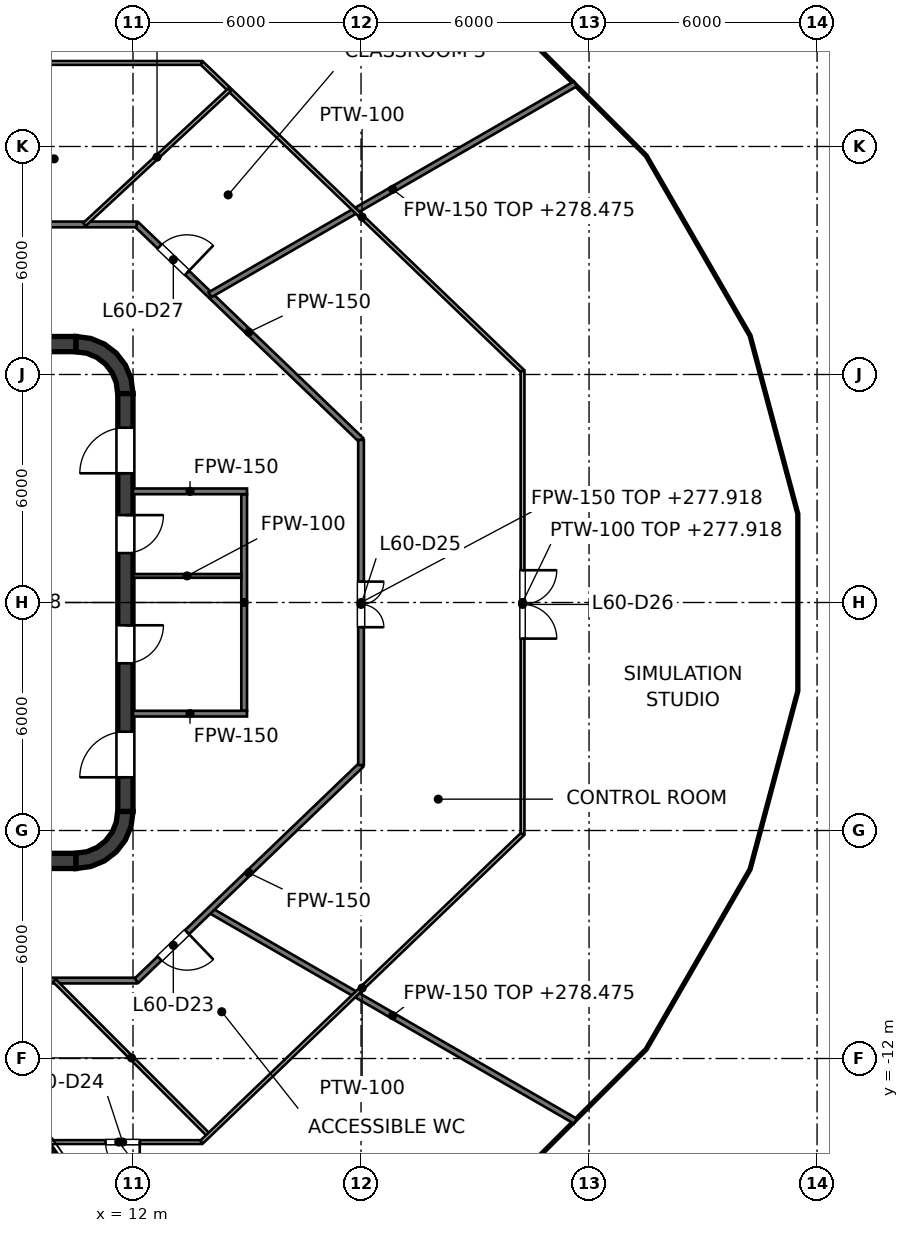
"""IFC4 building model, lengths in metres.
Left out: names, types, materials, properties, quantities, classifications, styles, units other than length and angle.
Written with IfcOpenShell. Run it as: python <this file> out.ifc"""

import sys

from ifc_helpers import new_model, si_unit, direction, frame, frame_2d, origin, place, context, subcontext, project, spatial, polyline, rectangle, outline, extrude, element, fill, save


model = new_model("IFC4")
c1 = context("Model", 3, precision=1e-05, world=origin(), true_north=direction((0.0, 1.0)))
c2 = subcontext(c1, "Body", "Model", "MODEL_VIEW")
j1 = project(units=[si_unit("LENGTHUNIT", "METRE"), si_unit("PLANEANGLEUNIT", "RADIAN")], contexts=[c1])
p1 = place(None, origin())
s1 = spatial("IfcSite", under=j1, at=p1, CompositionType="ELEMENT")
p2 = place(p1, origin())
s2 = spatial("IfcBuilding", under=s1, at=p2, CompositionType="ELEMENT")
p3 = place(p2, frame((0.0, 0.0, 275.0)))
s3 = spatial("IfcBuildingStorey", under=s2, at=p3, CompositionType="ELEMENT", Elevation=275.0)
for number, where, z_axis, x_axis in (
    (1, (-10.5, 6.8, 0.0), (0.0, 0.0, 1.0), (1.0, 0.0, 0.0)),
    (2, (-10.5, -6.8, 0.0), (0.0, 0.0, 1.0), (1.0, 0.0, 0.0)),
):
    element("IfcWall", number, at=place(p3, frame(where, z_axis=z_axis, x_axis=x_axis)), inside=s3, PredefinedType="SHEAR", context=c2, shape_type="SweptSolid", body=[
        extrude(rectangle(XDim=21.0, YDim=0.4, at=frame_2d((10.5, 0.0))), origin(), (0.0, 0.0, 1.0), 4.0),
    ])
p4 = place(p3, frame((11.8, -5.5, 0.0), z_axis=(0.0, 0.0, 1.0), x_axis=(0.0, 1.0, 0.0)))
e3 = element("IfcWall", 3, at=p4, inside=s3, PredefinedType="SHEAR", context=c2, shape_type="SweptSolid", body=[
    extrude(rectangle(XDim=11.0, YDim=0.4, at=frame_2d((5.5, 0.0))), origin(), (0.0, 0.0, 1.0), 4.0),
])
p5 = place(p4, frame((3.9, 0.0, 0.0)))
e4 = element("IfcOpeningElement", 4, at=p5, cuts=e3, PredefinedType="OPENING", context=c2, shape_type="SweptSolid", body=[
    extrude(rectangle(XDim=1.0, YDim=2.1, at=frame_2d((0.5, 1.05))), frame((0.0, 0.2, 0.0), z_axis=(0.0, -1.0, 0.0), x_axis=(1.0, 0.0, 0.0)), (0.0, 0.0, 1.0), 0.4),
])
p6 = place(p4, frame((6.8, 0.0, 0.0)))
e5 = element("IfcOpeningElement", 5, at=p6, cuts=e3, PredefinedType="OPENING", context=c2, shape_type="SweptSolid", body=[
    extrude(rectangle(XDim=1.0, YDim=2.1, at=frame_2d((0.5, 1.05))), frame((0.0, 0.2, 0.0), z_axis=(0.0, -1.0, 0.0), x_axis=(1.0, 0.0, 0.0)), (0.0, 0.0, 1.0), 0.4),
])
p7 = place(p4, frame((0.9, 0.0, 0.0)))
e6 = element("IfcOpeningElement", 6, at=p7, cuts=e3, PredefinedType="OPENING", context=c2, shape_type="SweptSolid", body=[
    extrude(rectangle(XDim=1.2, YDim=2.1, at=frame_2d((0.6, 1.05))), frame((0.0, 0.2, 0.0), z_axis=(0.0, -1.0, 0.0), x_axis=(1.0, 0.0, 0.0)), (0.0, 0.0, 1.0), 0.4),
])
p8 = place(p4, frame((8.9, 0.0, 0.0)))
e7 = element("IfcOpeningElement", 7, at=p8, cuts=e3, PredefinedType="OPENING", context=c2, shape_type="SweptSolid", body=[
    extrude(rectangle(XDim=1.2, YDim=2.1, at=frame_2d((0.6, 1.05))), frame((0.0, 0.2, 0.0), z_axis=(0.0, -1.0, 0.0), x_axis=(1.0, 0.0, 0.0)), (0.0, 0.0, 1.0), 0.4),
])
p9 = place(p3, origin())
e8 = element("IfcWall", 8, at=p9, inside=s3, PredefinedType="SHEAR", context=c2, shape_type="SweptSolid", body=[
    extrude(outline(polyline([(10.5, 7.0), (10.5, 6.596), (10.784, 6.559), (11.048, 6.45), (11.275, 6.275), (11.45, 6.048), (11.559, 5.784), (11.596, 5.5), (12.0, 5.5), (11.949, 5.888), (11.799, 6.25), (11.561, 6.561), (11.25, 6.799), (10.888, 6.949), (10.5, 7.0)])), origin(), (0.0, 0.0, 1.0), 4.0),
])
e9 = element("IfcWall", 9, at=p9, inside=s3, PredefinedType="SHEAR", context=c2, shape_type="SweptSolid", body=[
    extrude(outline(polyline([(12.0, -5.5), (11.596, -5.5), (11.559, -5.784), (11.45, -6.048), (11.275, -6.275), (11.048, -6.45), (10.784, -6.559), (10.5, -6.596), (10.5, -7.0), (10.888, -6.949), (11.25, -6.799), (11.561, -6.561), (11.799, -6.25), (11.949, -5.888), (12.0, -5.5)])), origin(), (0.0, 0.0, 1.0), 4.0),
])
p10 = place(p3, frame((14.925, -2.85, 0.0), z_axis=(0.0, 0.0, 1.0), x_axis=(0.0, 1.0, 0.0)))
e10 = element("IfcWall", 10, at=p10, inside=s3, PredefinedType="PARTITIONING", context=c2, shape_type="SweptSolid", body=[
    extrude(rectangle(XDim=5.7, YDim=0.15, at=frame_2d((2.85, 0.0))), origin(), (0.0, 0.0, 1.0), 2.918),
])
for number, where, z_axis, x_axis in (
    (11, (12.0, 2.925, 0.0), (0.0, 0.0, 1.0), (1.0, 0.0, 0.0)),
    (12, (12.0, -2.925, 0.0), (0.0, 0.0, 1.0), (1.0, 0.0, 0.0)),
):
    element("IfcWall", number, at=place(p3, frame(where, z_axis=z_axis, x_axis=x_axis)), inside=s3, PredefinedType="PARTITIONING", context=c2, shape_type="SweptSolid", body=[
        extrude(rectangle(XDim=3.0, YDim=0.15, at=frame_2d((1.5, 0.0))), origin(), (0.0, 0.0, 1.0), 2.927),
    ])
p11 = place(p3, frame((12.0, 0.7, 0.0), z_axis=(0.0, 0.0, 1.0), x_axis=(1.0, 0.0, 0.0)))
e13 = element("IfcWall", 13, at=p11, inside=s3, PredefinedType="PARTITIONING", context=c2, shape_type="SweptSolid", body=[
    extrude(rectangle(XDim=2.85, YDim=0.1, at=frame_2d((1.425, 0.0))), origin(), (0.0, 0.0, 1.0), 3.85),
])
p12 = place(p3, frame((12.095, 9.949, 0.0), z_axis=(0.0, 0.0, 1.0), x_axis=(0.721290181137, -0.692633001376, 0.0)))
e14 = element("IfcWall", 14, at=p12, inside=s3, PredefinedType="PARTITIONING", context=c2, shape_type="SweptSolid", body=[
    extrude(rectangle(XDim=8.187, YDim=0.15, at=frame_2d((4.094, 0.0))), origin(), (0.0, 0.0, 1.0), 2.927),
])
p13 = place(p12, frame((0.838, 0.0, 0.0)))
e15 = element("IfcOpeningElement", 15, at=p13, cuts=e14, PredefinedType="OPENING", context=c2, shape_type="SweptSolid", body=[
    extrude(rectangle(XDim=1.0, YDim=2.1, at=frame_2d((0.5, 1.05))), frame((0.0, 0.075, 0.0), z_axis=(0.0, -1.0, 0.0), x_axis=(1.0, 0.0, 0.0)), (0.0, 0.0, 1.0), 0.15),
])
p14 = place(p3, frame((14.024, -8.097, 0.0), z_axis=(0.0, 0.0, 1.0), x_axis=(0.86601678782, -0.50001492299, 0.0)))
e16 = element("IfcWall", 16, at=p14, inside=s3, PredefinedType="PARTITIONING", context=c2, shape_type="SweptSolid", body=[
    extrude(rectangle(XDim=11.104, YDim=0.15, at=frame_2d((5.552, 0.0))), origin(), (0.0, 0.0, 1.0), 3.475),
])
p15 = place(p3, frame((-12.095, -9.949, 0.0), z_axis=(0.0, 0.0, 1.0), x_axis=(1.0, 0.0, 0.0)))
e17 = element("IfcWall", 17, at=p15, inside=s3, PredefinedType="PARTITIONING", context=c2, shape_type="SweptSolid", body=[
    extrude(rectangle(XDim=24.19, YDim=0.15, at=frame_2d((12.095, 0.0))), origin(), (0.0, 0.0, 1.0), 2.927),
])
p16 = place(p15, frame((4.215, 0.0, 0.0)))
e18 = element("IfcOpeningElement", 18, at=p16, cuts=e17, PredefinedType="OPENING", context=c2, shape_type="SweptSolid", body=[
    extrude(rectangle(XDim=1.0, YDim=2.1, at=frame_2d((0.5, 1.05))), frame((0.0, 0.075, 0.0), z_axis=(0.0, -1.0, 0.0), x_axis=(1.0, 0.0, 0.0)), (0.0, 0.0, 1.0), 0.15),
])
p17 = place(p15, frame((10.029, 0.0, 0.0)))
e19 = element("IfcOpeningElement", 19, at=p17, cuts=e17, PredefinedType="OPENING", context=c2, shape_type="SweptSolid", body=[
    extrude(rectangle(XDim=1.0, YDim=2.1, at=frame_2d((0.5, 1.05))), frame((0.0, 0.075, 0.0), z_axis=(0.0, -1.0, 0.0), x_axis=(1.0, 0.0, 0.0)), (0.0, 0.0, 1.0), 0.15),
])
p18 = place(p15, frame((16.297, 0.0, 0.0)))
e20 = element("IfcOpeningElement", 20, at=p18, cuts=e17, PredefinedType="OPENING", context=c2, shape_type="SweptSolid", body=[
    extrude(rectangle(XDim=1.0, YDim=2.1, at=frame_2d((0.5, 1.05))), frame((0.0, 0.075, 0.0), z_axis=(0.0, -1.0, 0.0), x_axis=(1.0, 0.0, 0.0)), (0.0, 0.0, 1.0), 0.15),
])
p19 = place(p3, frame((-12.095, 9.949, 0.0), z_axis=(0.0, 0.0, 1.0), x_axis=(1.0, 0.0, 0.0)))
e21 = element("IfcWall", 21, at=p19, inside=s3, PredefinedType="PARTITIONING", context=c2, shape_type="SweptSolid", body=[
    extrude(rectangle(XDim=24.19, YDim=0.15, at=frame_2d((12.095, 0.0))), origin(), (0.0, 0.0, 1.0), 2.927),
])
p20 = place(p19, frame((20.297, 0.0, 0.0)))
e22 = element("IfcOpeningElement", 22, at=p20, cuts=e21, PredefinedType="OPENING", context=c2, shape_type="SweptSolid", body=[
    extrude(rectangle(XDim=1.0, YDim=2.1, at=frame_2d((0.5, 1.05))), frame((0.0, 0.075, 0.0), z_axis=(0.0, -1.0, 0.0), x_axis=(1.0, 0.0, 0.0)), (0.0, 0.0, 1.0), 0.15),
])
p21 = place(p19, frame((16.269, 0.0, 0.0)))
e23 = element("IfcOpeningElement", 23, at=p21, cuts=e21, PredefinedType="OPENING", context=c2, shape_type="SweptSolid", body=[
    extrude(rectangle(XDim=1.0, YDim=2.1, at=frame_2d((0.5, 1.05))), frame((0.0, 0.075, 0.0), z_axis=(0.0, -1.0, 0.0), x_axis=(1.0, 0.0, 0.0)), (0.0, 0.0, 1.0), 0.15),
])
p22 = place(p19, frame((12.14, 0.0, 0.0)))
e24 = element("IfcOpeningElement", 24, at=p22, cuts=e21, PredefinedType="OPENING", context=c2, shape_type="SweptSolid", body=[
    extrude(rectangle(XDim=1.0, YDim=2.1, at=frame_2d((0.5, 1.05))), frame((0.0, 0.075, 0.0), z_axis=(0.0, -1.0, 0.0), x_axis=(1.0, 0.0, 0.0)), (0.0, 0.0, 1.0), 0.15),
])
p23 = place(p19, frame((5.782, 0.0, 0.0)))
e25 = element("IfcOpeningElement", 25, at=p23, cuts=e21, PredefinedType="OPENING", context=c2, shape_type="SweptSolid", body=[
    extrude(rectangle(XDim=1.0, YDim=2.1, at=frame_2d((0.5, 1.05))), frame((0.0, 0.075, 0.0), z_axis=(0.0, -1.0, 0.0), x_axis=(1.0, 0.0, 0.0)), (0.0, 0.0, 1.0), 0.15),
])
p24 = place(p3, frame((14.024, 8.097, 0.0), z_axis=(0.0, 0.0, 1.0), x_axis=(0.866044269757, 0.499967321754, 0.0)))
e26 = element("IfcWall", 26, at=p24, inside=s3, PredefinedType="PARTITIONING", context=c2, shape_type="SweptSolid", body=[
    extrude(rectangle(XDim=11.105, YDim=0.15, at=frame_2d((5.552, 0.0))), origin(), (0.0, 0.0, 1.0), 3.475),
])
p25 = place(p3, frame((12.095, -9.949, 0.0), z_axis=(0.0, 0.0, 1.0), x_axis=(0.721290181137, 0.692633001376, 0.0)))
e27 = element("IfcWall", 27, at=p25, inside=s3, PredefinedType="PARTITIONING", context=c2, shape_type="SweptSolid", body=[
    extrude(rectangle(XDim=8.187, YDim=0.15, at=frame_2d((4.094, 0.0))), origin(), (0.0, 0.0, 1.0), 2.927),
])
p26 = place(p25, frame((0.839, 0.0, 0.0)))
e28 = element("IfcOpeningElement", 28, at=p26, cuts=e27, PredefinedType="OPENING", context=c2, shape_type="SweptSolid", body=[
    extrude(rectangle(XDim=1.0, YDim=2.1, at=frame_2d((0.5, 1.05))), frame((0.0, 0.075, 0.0), z_axis=(0.0, -1.0, 0.0), x_axis=(1.0, 0.0, 0.0)), (0.0, 0.0, 1.0), 0.15),
])
p27 = place(p3, frame((18.0, -4.278, 0.0), z_axis=(0.0, 0.0, 1.0), x_axis=(0.0, 1.0, 0.0)))
e29 = element("IfcWall", 29, at=p27, inside=s3, PredefinedType="PARTITIONING", context=c2, shape_type="SweptSolid", body=[
    extrude(rectangle(XDim=8.556, YDim=0.15, at=frame_2d((4.278, 0.0))), origin(), (0.0, 0.0, 1.0), 2.918),
])
p28 = place(p27, frame((3.627, 0.0, 0.0)))
e30 = element("IfcOpeningElement", 30, at=p28, cuts=e29, PredefinedType="OPENING", context=c2, shape_type="SweptSolid", body=[
    extrude(rectangle(XDim=1.2, YDim=2.1, at=frame_2d((0.6, 1.05))), frame((0.0, 0.075, 0.0), z_axis=(0.0, -1.0, 0.0), x_axis=(1.0, 0.0, 0.0)), (0.0, 0.0, 1.0), 0.15),
])
p29 = place(p3, frame((9.797, -14.251, 0.0), z_axis=(0.0, 0.0, 1.0), x_axis=(0.566456270614, -0.824091799184, 0.0)))
e31 = element("IfcWall", 31, at=p29, inside=s3, PredefinedType="PARTITIONING", context=c2, shape_type="SweptSolid", body=[
    extrude(rectangle(XDim=7.427, YDim=0.05, at=frame_2d((3.713, 0.0))), origin(), (0.0, 0.0, 1.0), 2.927),
])
p30 = place(p3, frame((9.931, -9.949, 0.0), z_axis=(0.0, 0.0, 1.0), x_axis=(0.706405887394, -0.707806980932, 0.0)))
e32 = element("IfcWall", 32, at=p30, inside=s3, PredefinedType="PARTITIONING", context=c2, shape_type="SweptSolid", body=[
    extrude(rectangle(XDim=5.75, YDim=0.1, at=frame_2d((2.875, 0.0))), origin(), (0.0, 0.0, 1.0), 3.85),
])
p31 = place(p3, frame((13.805, 14.199, 0.0), z_axis=(0.0, 0.0, 1.0), x_axis=(0.721245635319, -0.692679387259, 0.0)))
e33 = element("IfcWall", 33, at=p31, inside=s3, PredefinedType="PARTITIONING", context=c2, shape_type="SweptSolid", body=[
    extrude(rectangle(XDim=11.709, YDim=0.1, at=frame_2d((5.854, 0.0))), origin(), (0.0, 0.0, 1.0), 2.927),
])
p32 = place(p3, frame((9.445, -14.199, 0.0), z_axis=(0.0, 0.0, 1.0), x_axis=(1.0, 0.0, 0.0)))
e34 = element("IfcWall", 34, at=p32, inside=s3, PredefinedType="PARTITIONING", context=c2, shape_type="SweptSolid", body=[
    extrude(rectangle(XDim=4.36, YDim=0.1, at=frame_2d((2.18, 0.0))), origin(), (0.0, 0.0, 1.0), 2.927),
])
p33 = place(p32, frame((1.833, 0.0, 0.0)))
e35 = element("IfcOpeningElement", 35, at=p33, cuts=e34, PredefinedType="OPENING", context=c2, shape_type="SweptSolid", body=[
    extrude(rectangle(XDim=0.9, YDim=2.1, at=frame_2d((0.45, 1.05))), frame((0.0, 0.05, 0.0), z_axis=(0.0, -1.0, 0.0), x_axis=(1.0, 0.0, 0.0)), (0.0, 0.0, 1.0), 0.1),
])
p34 = place(p3, frame((-13.805, 14.199, 0.0), z_axis=(0.0, 0.0, 1.0), x_axis=(1.0, 0.0, 0.0)))
e36 = element("IfcWall", 36, at=p34, inside=s3, PredefinedType="PARTITIONING", context=c2, shape_type="SweptSolid", body=[
    extrude(rectangle(XDim=27.61, YDim=0.1, at=frame_2d((13.805, 0.0))), origin(), (0.0, 0.0, 1.0), 2.927),
])
p35 = place(p34, frame((20.047, 0.0, 0.0)))
e37 = element("IfcOpeningElement", 37, at=p35, cuts=e36, PredefinedType="OPENING", context=c2, shape_type="SweptSolid", body=[
    extrude(rectangle(XDim=0.9, YDim=2.1, at=frame_2d((0.45, 1.05))), frame((0.0, 0.05, 0.0), z_axis=(0.0, -1.0, 0.0), x_axis=(1.0, 0.0, 0.0)), (0.0, 0.0, 1.0), 0.1),
])
p36 = place(p34, frame((4.928, 0.0, 0.0)))
e38 = element("IfcOpeningElement", 38, at=p36, cuts=e36, PredefinedType="OPENING", context=c2, shape_type="SweptSolid", body=[
    extrude(rectangle(XDim=1.8, YDim=2.1, at=frame_2d((0.9, 1.05))), frame((0.0, 0.05, 0.0), z_axis=(0.0, -1.0, 0.0), x_axis=(1.0, 0.0, 0.0)), (0.0, 0.0, 1.0), 0.1),
])
p37 = place(p3, frame((10.723, 9.949, 0.0), z_axis=(0.0, 0.0, 1.0), x_axis=(0.733025495712, 0.680201163359, 0.0)))
e39 = element("IfcWall", 39, at=p37, inside=s3, PredefinedType="PARTITIONING", context=c2, shape_type="SweptSolid", body=[
    extrude(rectangle(XDim=5.209, YDim=0.1, at=frame_2d((2.604, 0.0))), origin(), (0.0, 0.0, 1.0), 3.85),
])
p38 = place(p3, frame((13.805, -14.199, 0.0), z_axis=(0.0, 0.0, 1.0), x_axis=(0.721439820897, 0.69247713668, 0.0)))
e40 = element("IfcWall", 40, at=p38, inside=s3, PredefinedType="PARTITIONING", context=c2, shape_type="SweptSolid", body=[
    extrude(rectangle(XDim=11.708, YDim=0.1, at=frame_2d((5.854, 0.0))), origin(), (0.0, 0.0, 1.0), 2.927),
])
p39 = place(p3, frame((22.25, -6.089, 0.0), z_axis=(0.0, 0.0, 1.0), x_axis=(0.0, 1.0, 0.0)))
e41 = element("IfcWall", 41, at=p39, inside=s3, PredefinedType="PARTITIONING", context=c2, shape_type="SweptSolid", body=[
    extrude(rectangle(XDim=12.178, YDim=0.1, at=frame_2d((6.089, 0.0))), origin(), (0.0, 0.0, 1.0), 2.918),
])
p40 = place(p39, frame((5.139, 0.0, 0.0)))
e42 = element("IfcOpeningElement", 42, at=p40, cuts=e41, PredefinedType="OPENING", context=c2, shape_type="SweptSolid", body=[
    extrude(rectangle(XDim=1.8, YDim=2.1, at=frame_2d((0.9, 1.05))), frame((0.0, 0.05, 0.0), z_axis=(0.0, -1.0, 0.0), x_axis=(1.0, 0.0, 0.0)), (0.0, 0.0, 1.0), 0.1),
])
p41 = place(p5, origin())
e43 = element("IfcDoor", 43, at=p41, inside=s3, OperationType="SINGLE_SWING_RIGHT", PredefinedType="DOOR", context=c2, shape_type="SweptSolid", body=[
    extrude(rectangle(XDim=1.0, YDim=2.1, at=frame_2d((0.5, 1.05))), frame((0.0, 0.025, 0.0), z_axis=(0.0, -1.0, 0.0), x_axis=(1.0, 0.0, 0.0)), (0.0, 0.0, 1.0), 0.05),
])
fill(e4, e43)
p42 = place(p6, origin())
e44 = element("IfcDoor", 44, at=p42, inside=s3, OperationType="SINGLE_SWING_RIGHT", PredefinedType="DOOR", context=c2, shape_type="SweptSolid", body=[
    extrude(rectangle(XDim=1.0, YDim=2.1, at=frame_2d((0.5, 1.05))), frame((0.0, 0.025, 0.0), z_axis=(0.0, -1.0, 0.0), x_axis=(1.0, 0.0, 0.0)), (0.0, 0.0, 1.0), 0.05),
])
fill(e5, e44)
p43 = place(p7, origin())
e45 = element("IfcDoor", 45, at=p43, inside=s3, OperationType="SINGLE_SWING_LEFT", PredefinedType="DOOR", context=c2, shape_type="SweptSolid", body=[
    extrude(rectangle(XDim=1.2, YDim=2.1, at=frame_2d((0.6, 1.05))), frame((0.0, 0.025, 0.0), z_axis=(0.0, -1.0, 0.0), x_axis=(1.0, 0.0, 0.0)), (0.0, 0.0, 1.0), 0.05),
])
fill(e6, e45)
p44 = place(p8, origin())
e46 = element("IfcDoor", 46, at=p44, inside=s3, OperationType="SINGLE_SWING_LEFT", PredefinedType="DOOR", context=c2, shape_type="SweptSolid", body=[
    extrude(rectangle(XDim=1.2, YDim=2.1, at=frame_2d((0.6, 1.05))), frame((0.0, 0.025, 0.0), z_axis=(0.0, -1.0, 0.0), x_axis=(1.0, 0.0, 0.0)), (0.0, 0.0, 1.0), 0.05),
])
fill(e7, e46)
p45 = place(p26, origin())
e47 = element("IfcDoor", 47, at=p45, inside=s3, OperationType="SINGLE_SWING_RIGHT", PredefinedType="DOOR", context=c2, shape_type="SweptSolid", body=[
    extrude(rectangle(XDim=1.0, YDim=2.1, at=frame_2d((0.5, 1.05))), frame((0.0, 0.025, 0.0), z_axis=(0.0, -1.0, 0.0), x_axis=(1.0, 0.0, 0.0)), (0.0, 0.0, 1.0), 0.05),
])
fill(e28, e47)
p46 = place(p33, origin())
e48 = element("IfcDoor", 48, at=p46, inside=s3, OperationType="SINGLE_SWING_RIGHT", PredefinedType="DOOR", context=c2, shape_type="SweptSolid", body=[
    extrude(rectangle(XDim=0.9, YDim=2.1, at=frame_2d((0.45, 1.05))), frame((0.0, 0.025, 0.0), z_axis=(0.0, -1.0, 0.0), x_axis=(1.0, 0.0, 0.0)), (0.0, 0.0, 1.0), 0.05),
])
fill(e35, e48)
p47 = place(p28, origin())
e49 = element("IfcDoor", 49, at=p47, inside=s3, OperationType="DOUBLE_DOOR_SINGLE_SWING", PredefinedType="DOOR", context=c2, shape_type="SweptSolid", body=[
    extrude(rectangle(XDim=1.2, YDim=2.1, at=frame_2d((0.6, 1.05))), frame((0.0, 0.025, 0.0), z_axis=(0.0, -1.0, 0.0), x_axis=(1.0, 0.0, 0.0)), (0.0, 0.0, 1.0), 0.05),
])
fill(e30, e49)
p48 = place(p40, origin())
e50 = element("IfcDoor", 50, at=p48, inside=s3, OperationType="DOUBLE_DOOR_SINGLE_SWING", PredefinedType="DOOR", context=c2, shape_type="SweptSolid", body=[
    extrude(rectangle(XDim=1.8, YDim=2.1, at=frame_2d((0.9, 1.05))), frame((0.0, 0.025, 0.0), z_axis=(0.0, -1.0, 0.0), x_axis=(1.0, 0.0, 0.0)), (0.0, 0.0, 1.0), 0.05),
])
fill(e42, e50)
p49 = place(p13, origin())
e51 = element("IfcDoor", 51, at=p49, inside=s3, OperationType="SINGLE_SWING_RIGHT", PredefinedType="DOOR", context=c2, shape_type="SweptSolid", body=[
    extrude(rectangle(XDim=1.0, YDim=2.1, at=frame_2d((0.5, 1.05))), frame((0.0, 0.025, 0.0), z_axis=(0.0, -1.0, 0.0), x_axis=(1.0, 0.0, 0.0)), (0.0, 0.0, 1.0), 0.05),
])
fill(e15, e51)
save(model, sys.argv[1])
